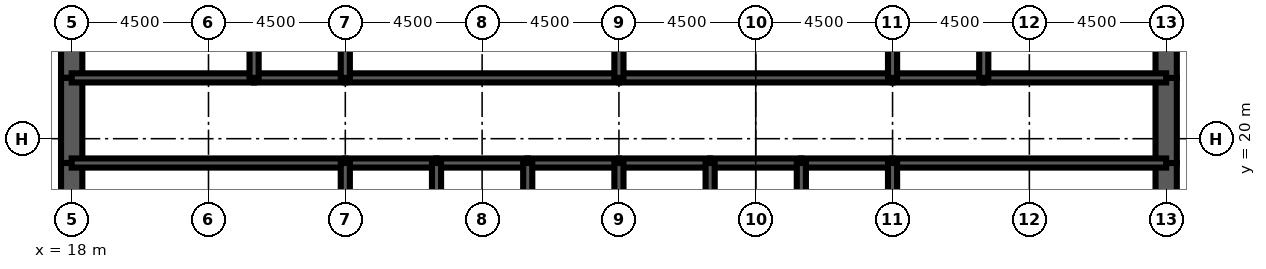
"""IFC4 building model, lengths in metres.
Left out: names, types, materials, properties, quantities, classifications, styles, units other than length and angle.
Written with IfcOpenShell. Run it as: python <this file> out.ifc"""

import sys

from ifc_helpers import new_model, si_unit, direction, frame, frame_2d, origin, place, context, subcontext, project, spatial, rectangle, extrude, element, fill, save


model = new_model("IFC4")
c1 = context("Model", 3, precision=1e-05, world=origin(), true_north=direction((0.0, 1.0)))
c2 = subcontext(c1, "Body", "Model", "MODEL_VIEW")
j1 = project(units=[si_unit("LENGTHUNIT", "METRE"), si_unit("PLANEANGLEUNIT", "RADIAN")], contexts=[c1])
p1 = place(None, origin())
s1 = spatial("IfcSite", under=j1, at=p1, CompositionType="ELEMENT")
p2 = place(p1, origin())
s2 = spatial("IfcBuilding", under=s1, at=p2, CompositionType="ELEMENT")
p3 = place(p2, frame((0.0, 0.0, 275.3)))
s3 = spatial("IfcBuildingStorey", under=s2, at=p3, CompositionType="ELEMENT", Elevation=275.3)
p4 = place(p3, frame((18.0, 26.0, 0.0), z_axis=(0.0, 0.0, 1.0), x_axis=(0.0, -1.0, 0.0)))
e1 = element("IfcWall", 1, at=p4, inside=s3, PredefinedType="SHEAR", context=c2, shape_type="SweptSolid", body=[
    extrude(rectangle(XDim=4.0, YDim=0.7, at=frame_2d((2.0, 0.0))), origin(), (0.0, 0.0, 1.0), 4.2),
])
p5 = place(p3, frame((18.0, 22.0, 0.0), z_axis=(0.0, 0.0, 1.0), x_axis=(0.0, -1.0, 0.0)))
e2 = element("IfcWall", 2, at=p5, inside=s3, PredefinedType="SHEAR", context=c2, shape_type="SweptSolid", body=[
    extrude(rectangle(XDim=2.8, YDim=0.7, at=frame_2d((1.4, 0.0))), origin(), (0.0, 0.0, 1.0), 4.2),
])
p6 = place(p5, frame((0.6, 0.0, 0.0)))
e3 = element("IfcOpeningElement", 3, at=p6, cuts=e2, PredefinedType="OPENING", context=c2, shape_type="SweptSolid", body=[
    extrude(rectangle(XDim=1.8, YDim=2.1, at=frame_2d((0.9, 1.05))), frame((0.0, 0.36, 0.0), z_axis=(0.0, -1.0, 0.0), x_axis=(1.0, 0.0, 0.0)), (0.0, 0.0, 1.0), 0.72),
])
for number, where, z_axis, x_axis in (
    (4, (18.0, 19.2, 0.0), (0.0, 0.0, 1.0), (0.0, -1.0, 0.0)),
    (5, (54.0, 16.0, 0.0), (0.0, 0.0, 1.0), (0.0, 1.0, 0.0)),
):
    element("IfcWall", number, at=place(p3, frame(where, z_axis=z_axis, x_axis=x_axis)), inside=s3, PredefinedType="SHEAR", context=c2, shape_type="SweptSolid", body=[
        extrude(rectangle(XDim=3.2, YDim=0.7, at=frame_2d((1.6, 0.0))), origin(), (0.0, 0.0, 1.0), 4.2),
    ])
p7 = place(p3, frame((54.0, 19.2, 0.0), z_axis=(0.0, 0.0, 1.0), x_axis=(0.0, 1.0, 0.0)))
e6 = element("IfcWall", 6, at=p7, inside=s3, PredefinedType="SHEAR", context=c2, shape_type="SweptSolid", body=[
    extrude(rectangle(XDim=2.8, YDim=0.7, at=frame_2d((1.4, 0.0))), origin(), (0.0, 0.0, 1.0), 4.2),
])
p8 = place(p7, frame((0.4, 0.0, 0.0)))
e7 = element("IfcOpeningElement", 7, at=p8, cuts=e6, PredefinedType="OPENING", context=c2, shape_type="SweptSolid", body=[
    extrude(rectangle(XDim=1.8, YDim=2.1, at=frame_2d((0.9, 1.05))), frame((0.0, 0.36, 0.0), z_axis=(0.0, -1.0, 0.0), x_axis=(1.0, 0.0, 0.0)), (0.0, 0.0, 1.0), 0.72),
])
p9 = place(p3, frame((54.0, 22.0, 0.0), z_axis=(0.0, 0.0, 1.0), x_axis=(0.0, 1.0, 0.0)))
e8 = element("IfcWall", 8, at=p9, inside=s3, PredefinedType="SHEAR", context=c2, shape_type="SweptSolid", body=[
    extrude(rectangle(XDim=4.0, YDim=0.7, at=frame_2d((2.0, 0.0))), origin(), (0.0, 0.0, 1.0), 4.2),
])
p10 = place(p3, frame((18.0, 19.2, 0.0), z_axis=(0.0, 0.0, 1.0), x_axis=(1.0, 0.0, 0.0)))
e9 = element("IfcWall", 9, at=p10, inside=s3, PredefinedType="SOLIDWALL", context=c2, shape_type="SweptSolid", body=[
    extrude(rectangle(XDim=9.0, YDim=0.3, at=frame_2d((4.5, 0.0))), origin(), (0.0, 0.0, 1.0), 4.2),
])
p11 = place(p10, frame((0.65, 0.0, 0.0)))
e10 = element("IfcOpeningElement", 10, at=p11, cuts=e9, PredefinedType="OPENING", context=c2, shape_type="SweptSolid", body=[
    extrude(rectangle(XDim=1.0, YDim=2.1, at=frame_2d((0.5, 1.05))), frame((0.0, 0.16, 0.0), z_axis=(0.0, -1.0, 0.0), x_axis=(1.0, 0.0, 0.0)), (0.0, 0.0, 1.0), 0.32),
])
p12 = place(p3, frame((27.0, 19.2, 0.0), z_axis=(0.0, 0.0, 1.0), x_axis=(1.0, 0.0, 0.0)))
e11 = element("IfcWall", 11, at=p12, inside=s3, PredefinedType="SOLIDWALL", context=c2, shape_type="SweptSolid", body=[
    extrude(rectangle(XDim=3.0, YDim=0.3, at=frame_2d((1.5, 0.0))), origin(), (0.0, 0.0, 1.0), 4.2),
])
p13 = place(p12, frame((0.95, 0.0, 0.0)))
e12 = element("IfcOpeningElement", 12, at=p13, cuts=e11, PredefinedType="OPENING", context=c2, shape_type="SweptSolid", body=[
    extrude(rectangle(XDim=1.1, YDim=2.2, at=frame_2d((0.55, 1.1))), frame((0.0, 0.16, 0.0), z_axis=(0.0, -1.0, 0.0), x_axis=(1.0, 0.0, 0.0)), (0.0, 0.0, 1.0), 0.32),
])
p14 = place(p3, frame((30.0, 19.2, 0.0), z_axis=(0.0, 0.0, 1.0), x_axis=(1.0, 0.0, 0.0)))
e13 = element("IfcWall", 13, at=p14, inside=s3, PredefinedType="SOLIDWALL", context=c2, shape_type="SweptSolid", body=[
    extrude(rectangle(XDim=3.0, YDim=0.3, at=frame_2d((1.5, 0.0))), origin(), (0.0, 0.0, 1.0), 4.2),
])
p15 = place(p14, frame((0.95, 0.0, 0.0)))
e14 = element("IfcOpeningElement", 14, at=p15, cuts=e13, PredefinedType="OPENING", context=c2, shape_type="SweptSolid", body=[
    extrude(rectangle(XDim=1.1, YDim=2.2, at=frame_2d((0.55, 1.1))), frame((0.0, 0.16, 0.0), z_axis=(0.0, -1.0, 0.0), x_axis=(1.0, 0.0, 0.0)), (0.0, 0.0, 1.0), 0.32),
])
p16 = place(p3, frame((33.0, 19.2, 0.0), z_axis=(0.0, 0.0, 1.0), x_axis=(1.0, 0.0, 0.0)))
e15 = element("IfcWall", 15, at=p16, inside=s3, PredefinedType="SOLIDWALL", context=c2, shape_type="SweptSolid", body=[
    extrude(rectangle(XDim=3.0, YDim=0.3, at=frame_2d((1.5, 0.0))), origin(), (0.0, 0.0, 1.0), 4.2),
])
p17 = place(p16, frame((0.95, 0.0, 0.0)))
e16 = element("IfcOpeningElement", 16, at=p17, cuts=e15, PredefinedType="OPENING", context=c2, shape_type="SweptSolid", body=[
    extrude(rectangle(XDim=1.1, YDim=2.2, at=frame_2d((0.55, 1.1))), frame((0.0, 0.16, 0.0), z_axis=(0.0, -1.0, 0.0), x_axis=(1.0, 0.0, 0.0)), (0.0, 0.0, 1.0), 0.32),
])
p18 = place(p3, frame((36.0, 19.2, 0.0), z_axis=(0.0, 0.0, 1.0), x_axis=(1.0, 0.0, 0.0)))
e17 = element("IfcWall", 17, at=p18, inside=s3, PredefinedType="SOLIDWALL", context=c2, shape_type="SweptSolid", body=[
    extrude(rectangle(XDim=3.0, YDim=0.3, at=frame_2d((1.5, 0.0))), origin(), (0.0, 0.0, 1.0), 4.2),
])
p19 = place(p18, frame((0.95, 0.0, 0.0)))
e18 = element("IfcOpeningElement", 18, at=p19, cuts=e17, PredefinedType="OPENING", context=c2, shape_type="SweptSolid", body=[
    extrude(rectangle(XDim=1.1, YDim=2.2, at=frame_2d((0.55, 1.1))), frame((0.0, 0.16, 0.0), z_axis=(0.0, -1.0, 0.0), x_axis=(1.0, 0.0, 0.0)), (0.0, 0.0, 1.0), 0.32),
])
p20 = place(p3, frame((39.0, 19.2, 0.0), z_axis=(0.0, 0.0, 1.0), x_axis=(1.0, 0.0, 0.0)))
e19 = element("IfcWall", 19, at=p20, inside=s3, PredefinedType="SOLIDWALL", context=c2, shape_type="SweptSolid", body=[
    extrude(rectangle(XDim=3.0, YDim=0.3, at=frame_2d((1.5, 0.0))), origin(), (0.0, 0.0, 1.0), 4.2),
])
p21 = place(p20, frame((1.0, 0.0, 0.0)))
e20 = element("IfcOpeningElement", 20, at=p21, cuts=e19, PredefinedType="OPENING", context=c2, shape_type="SweptSolid", body=[
    extrude(rectangle(XDim=1.0, YDim=2.1, at=frame_2d((0.5, 1.05))), frame((0.0, 0.16, 0.0), z_axis=(0.0, -1.0, 0.0), x_axis=(1.0, 0.0, 0.0)), (0.0, 0.0, 1.0), 0.32),
])
p22 = place(p3, frame((42.0, 19.2, 0.0), z_axis=(0.0, 0.0, 1.0), x_axis=(1.0, 0.0, 0.0)))
e21 = element("IfcWall", 21, at=p22, inside=s3, PredefinedType="SOLIDWALL", context=c2, shape_type="SweptSolid", body=[
    extrude(rectangle(XDim=3.0, YDim=0.3, at=frame_2d((1.5, 0.0))), origin(), (0.0, 0.0, 1.0), 4.2),
])
p23 = place(p22, frame((1.0, 0.0, 0.0)))
e22 = element("IfcOpeningElement", 22, at=p23, cuts=e21, PredefinedType="OPENING", context=c2, shape_type="SweptSolid", body=[
    extrude(rectangle(XDim=1.0, YDim=2.1, at=frame_2d((0.5, 1.05))), frame((0.0, 0.16, 0.0), z_axis=(0.0, -1.0, 0.0), x_axis=(1.0, 0.0, 0.0)), (0.0, 0.0, 1.0), 0.32),
])
p24 = place(p3, frame((45.0, 19.2, 0.0), z_axis=(0.0, 0.0, 1.0), x_axis=(1.0, 0.0, 0.0)))
e23 = element("IfcWall", 23, at=p24, inside=s3, PredefinedType="SOLIDWALL", context=c2, shape_type="SweptSolid", body=[
    extrude(rectangle(XDim=9.0, YDim=0.3, at=frame_2d((4.5, 0.0))), origin(), (0.0, 0.0, 1.0), 4.2),
])
p25 = place(p24, frame((7.35, 0.0, 0.0)))
e24 = element("IfcOpeningElement", 24, at=p25, cuts=e23, PredefinedType="OPENING", context=c2, shape_type="SweptSolid", body=[
    extrude(rectangle(XDim=1.0, YDim=2.1, at=frame_2d((0.5, 1.05))), frame((0.0, 0.16, 0.0), z_axis=(0.0, -1.0, 0.0), x_axis=(1.0, 0.0, 0.0)), (0.0, 0.0, 1.0), 0.32),
])
p26 = place(p3, frame((18.0, 22.0, 0.0), z_axis=(0.0, 0.0, 1.0), x_axis=(1.0, 0.0, 0.0)))
e25 = element("IfcWall", 25, at=p26, inside=s3, PredefinedType="SOLIDWALL", context=c2, shape_type="SweptSolid", body=[
    extrude(rectangle(XDim=6.0, YDim=0.3, at=frame_2d((3.0, 0.0))), origin(), (0.0, 0.0, 1.0), 4.2),
])
p27 = place(p26, frame((4.4, 0.0, 0.0)))
e26 = element("IfcOpeningElement", 26, at=p27, cuts=e25, PredefinedType="OPENING", context=c2, shape_type="SweptSolid", body=[
    extrude(rectangle(XDim=1.0, YDim=2.1, at=frame_2d((0.5, 1.05))), frame((0.0, 0.16, 0.0), z_axis=(0.0, -1.0, 0.0), x_axis=(1.0, 0.0, 0.0)), (0.0, 0.0, 1.0), 0.32),
])
p28 = place(p26, frame((0.9, 0.0, 0.0)))
e27 = element("IfcOpeningElement", 27, at=p28, cuts=e25, PredefinedType="OPENING", context=c2, shape_type="SweptSolid", body=[
    extrude(rectangle(XDim=1.0, YDim=2.1, at=frame_2d((0.5, 1.05))), frame((0.0, 0.16, 0.0), z_axis=(0.0, -1.0, 0.0), x_axis=(1.0, 0.0, 0.0)), (0.0, 0.0, 1.0), 0.32),
])
p29 = place(p3, frame((24.0, 22.0, 0.0), z_axis=(0.0, 0.0, 1.0), x_axis=(1.0, 0.0, 0.0)))
e28 = element("IfcWall", 28, at=p29, inside=s3, PredefinedType="SOLIDWALL", context=c2, shape_type="SweptSolid", body=[
    extrude(rectangle(XDim=3.0, YDim=0.3, at=frame_2d((1.5, 0.0))), origin(), (0.0, 0.0, 1.0), 4.2),
])
p30 = place(p29, frame((1.0, 0.0, 0.0)))
e29 = element("IfcOpeningElement", 29, at=p30, cuts=e28, PredefinedType="OPENING", context=c2, shape_type="SweptSolid", body=[
    extrude(rectangle(XDim=1.0, YDim=2.1, at=frame_2d((0.5, 1.05))), frame((0.0, 0.16, 0.0), z_axis=(0.0, -1.0, 0.0), x_axis=(1.0, 0.0, 0.0)), (0.0, 0.0, 1.0), 0.32),
])
p31 = place(p3, frame((27.0, 22.0, 0.0), z_axis=(0.0, 0.0, 1.0), x_axis=(1.0, 0.0, 0.0)))
e30 = element("IfcWall", 30, at=p31, inside=s3, PredefinedType="SOLIDWALL", context=c2, shape_type="SweptSolid", body=[
    extrude(rectangle(XDim=9.0, YDim=0.3, at=frame_2d((4.5, 0.0))), origin(), (0.0, 0.0, 1.0), 4.2),
])
p32 = place(p31, frame((4.0, 0.0, 0.0)))
e31 = element("IfcOpeningElement", 31, at=p32, cuts=e30, PredefinedType="OPENING", context=c2, shape_type="SweptSolid", body=[
    extrude(rectangle(XDim=1.0, YDim=2.1, at=frame_2d((0.5, 1.05))), frame((0.0, 0.16, 0.0), z_axis=(0.0, -1.0, 0.0), x_axis=(1.0, 0.0, 0.0)), (0.0, 0.0, 1.0), 0.32),
])
p33 = place(p3, frame((36.0, 22.0, 0.0), z_axis=(0.0, 0.0, 1.0), x_axis=(1.0, 0.0, 0.0)))
e32 = element("IfcWall", 32, at=p33, inside=s3, PredefinedType="SOLIDWALL", context=c2, shape_type="SweptSolid", body=[
    extrude(rectangle(XDim=9.0, YDim=0.3, at=frame_2d((4.5, 0.0))), origin(), (0.0, 0.0, 1.0), 4.2),
])
p34 = place(p33, frame((4.0, 0.0, 0.0)))
e33 = element("IfcOpeningElement", 33, at=p34, cuts=e32, PredefinedType="OPENING", context=c2, shape_type="SweptSolid", body=[
    extrude(rectangle(XDim=1.0, YDim=2.1, at=frame_2d((0.5, 1.05))), frame((0.0, 0.16, 0.0), z_axis=(0.0, -1.0, 0.0), x_axis=(1.0, 0.0, 0.0)), (0.0, 0.0, 1.0), 0.32),
])
p35 = place(p3, frame((45.0, 22.0, 0.0), z_axis=(0.0, 0.0, 1.0), x_axis=(1.0, 0.0, 0.0)))
e34 = element("IfcWall", 34, at=p35, inside=s3, PredefinedType="SOLIDWALL", context=c2, shape_type="SweptSolid", body=[
    extrude(rectangle(XDim=3.0, YDim=0.3, at=frame_2d((1.5, 0.0))), origin(), (0.0, 0.0, 1.0), 4.2),
])
p36 = place(p35, frame((1.0, 0.0, 0.0)))
e35 = element("IfcOpeningElement", 35, at=p36, cuts=e34, PredefinedType="OPENING", context=c2, shape_type="SweptSolid", body=[
    extrude(rectangle(XDim=1.0, YDim=2.1, at=frame_2d((0.5, 1.05))), frame((0.0, 0.16, 0.0), z_axis=(0.0, -1.0, 0.0), x_axis=(1.0, 0.0, 0.0)), (0.0, 0.0, 1.0), 0.32),
])
p37 = place(p3, frame((48.0, 22.0, 0.0), z_axis=(0.0, 0.0, 1.0), x_axis=(1.0, 0.0, 0.0)))
e36 = element("IfcWall", 36, at=p37, inside=s3, PredefinedType="SOLIDWALL", context=c2, shape_type="SweptSolid", body=[
    extrude(rectangle(XDim=6.0, YDim=0.3, at=frame_2d((3.0, 0.0))), origin(), (0.0, 0.0, 1.0), 4.2),
])
p38 = place(p37, frame((2.0, 0.0, 0.0)))
e37 = element("IfcOpeningElement", 37, at=p38, cuts=e36, PredefinedType="OPENING", context=c2, shape_type="SweptSolid", body=[
    extrude(rectangle(XDim=1.0, YDim=2.1, at=frame_2d((0.5, 1.05))), frame((0.0, 0.16, 0.0), z_axis=(0.0, -1.0, 0.0), x_axis=(1.0, 0.0, 0.0)), (0.0, 0.0, 1.0), 0.32),
])
p39 = place(p37, frame((4.1, 0.0, 0.0)))
e38 = element("IfcOpeningElement", 38, at=p39, cuts=e36, PredefinedType="OPENING", context=c2, shape_type="SweptSolid", body=[
    extrude(rectangle(XDim=1.0, YDim=2.1, at=frame_2d((0.5, 1.05))), frame((0.0, 0.16, 0.0), z_axis=(0.0, -1.0, 0.0), x_axis=(1.0, 0.0, 0.0)), (0.0, 0.0, 1.0), 0.32),
])
for number, where, z_axis, x_axis in (
    (39, (27.0, 16.0, 0.0), (0.0, 0.0, 1.0), (0.0, 1.0, 0.0)),
    (40, (30.0, 16.0, 0.0), (0.0, 0.0, 1.0), (0.0, 1.0, 0.0)),
    (41, (33.0, 16.0, 0.0), (0.0, 0.0, 1.0), (0.0, 1.0, 0.0)),
    (42, (36.0, 16.0, 0.0), (0.0, 0.0, 1.0), (0.0, 1.0, 0.0)),
    (43, (39.0, 16.0, 0.0), (0.0, 0.0, 1.0), (0.0, 1.0, 0.0)),
    (44, (42.0, 16.0, 0.0), (0.0, 0.0, 1.0), (0.0, 1.0, 0.0)),
    (45, (45.0, 16.0, 0.0), (0.0, 0.0, 1.0), (0.0, 1.0, 0.0)),
):
    element("IfcWall", number, at=place(p3, frame(where, z_axis=z_axis, x_axis=x_axis)), inside=s3, PredefinedType="SOLIDWALL", context=c2, shape_type="SweptSolid", body=[
        extrude(rectangle(XDim=3.2, YDim=0.3, at=frame_2d((1.6, 0.0))), origin(), (0.0, 0.0, 1.0), 4.2),
    ])
for number, where, z_axis, x_axis in (
    (46, (24.0, 22.0, 0.0), (0.0, 0.0, 1.0), (0.0, 1.0, 0.0)),
    (47, (27.0, 22.0, 0.0), (0.0, 0.0, 1.0), (0.0, 1.0, 0.0)),
    (48, (36.0, 22.0, 0.0), (0.0, 0.0, 1.0), (0.0, 1.0, 0.0)),
    (49, (45.0, 22.0, 0.0), (0.0, 0.0, 1.0), (0.0, 1.0, 0.0)),
    (50, (48.0, 22.0, 0.0), (0.0, 0.0, 1.0), (0.0, 1.0, 0.0)),
):
    element("IfcWall", number, at=place(p3, frame(where, z_axis=z_axis, x_axis=x_axis)), inside=s3, PredefinedType="SOLIDWALL", context=c2, shape_type="SweptSolid", body=[
        extrude(rectangle(XDim=4.0, YDim=0.3, at=frame_2d((2.0, 0.0))), origin(), (0.0, 0.0, 1.0), 4.2),
    ])
p40 = place(p3, frame((42.0, 22.15, 0.0), z_axis=(0.0, 0.0, 1.0), x_axis=(0.0, 1.0, 0.0)))
e51 = element("IfcWall", 51, at=p40, inside=s3, PredefinedType="PARTITIONING", context=c2, shape_type="SweptSolid", body=[
    extrude(rectangle(XDim=3.7, YDim=0.15, at=frame_2d((1.85, 0.0))), origin(), (0.0, 0.0, 1.0), 3.0),
])
p41 = place(p40, frame((2.2, 0.0, 0.0)))
e52 = element("IfcOpeningElement", 52, at=p41, cuts=e51, PredefinedType="OPENING", context=c2, shape_type="SweptSolid", body=[
    extrude(rectangle(XDim=1.0, YDim=2.1, at=frame_2d((0.5, 1.05))), frame((0.0, 0.085, 0.0), z_axis=(0.0, -1.0, 0.0), x_axis=(1.0, 0.0, 0.0)), (0.0, 0.0, 1.0), 0.17),
])
for number, where, z_axis, x_axis in (
    (53, (20.525, 22.15, 0.0), (0.0, 0.0, 1.0), (0.0, 1.0, 0.0)),
    (54, (51.475, 22.15, 0.0), (0.0, 0.0, 1.0), (0.0, 1.0, 0.0)),
):
    element("IfcWall", number, at=place(p3, frame(where, z_axis=z_axis, x_axis=x_axis)), inside=s3, PredefinedType="PARTITIONING", context=c2, shape_type="SweptSolid", body=[
        extrude(rectangle(XDim=3.7, YDim=0.15, at=frame_2d((1.85, 0.0))), origin(), (0.0, 0.0, 1.0), 3.0),
    ])
p42 = place(p13, origin())
e55 = element("IfcDoor", 55, at=p42, inside=s3, OperationType="DOUBLE_DOOR_SLIDING", PredefinedType="USERDEFINED", context=c2, shape_type="SweptSolid", body=[
    extrude(rectangle(XDim=1.1, YDim=2.2, at=frame_2d((0.55, 1.1))), frame((0.0, 0.025, 0.0), z_axis=(0.0, -1.0, 0.0), x_axis=(1.0, 0.0, 0.0)), (0.0, 0.0, 1.0), 0.05),
])
fill(e12, e55)
p43 = place(p15, origin())
e56 = element("IfcDoor", 56, at=p43, inside=s3, OperationType="DOUBLE_DOOR_SLIDING", PredefinedType="USERDEFINED", context=c2, shape_type="SweptSolid", body=[
    extrude(rectangle(XDim=1.1, YDim=2.2, at=frame_2d((0.55, 1.1))), frame((0.0, 0.025, 0.0), z_axis=(0.0, -1.0, 0.0), x_axis=(1.0, 0.0, 0.0)), (0.0, 0.0, 1.0), 0.05),
])
fill(e14, e56)
p44 = place(p17, origin())
e57 = element("IfcDoor", 57, at=p44, inside=s3, OperationType="DOUBLE_DOOR_SLIDING", PredefinedType="USERDEFINED", context=c2, shape_type="SweptSolid", body=[
    extrude(rectangle(XDim=1.1, YDim=2.2, at=frame_2d((0.55, 1.1))), frame((0.0, 0.025, 0.0), z_axis=(0.0, -1.0, 0.0), x_axis=(1.0, 0.0, 0.0)), (0.0, 0.0, 1.0), 0.05),
])
fill(e16, e57)
p45 = place(p19, origin())
e58 = element("IfcDoor", 58, at=p45, inside=s3, OperationType="DOUBLE_DOOR_SLIDING", PredefinedType="USERDEFINED", context=c2, shape_type="SweptSolid", body=[
    extrude(rectangle(XDim=1.1, YDim=2.2, at=frame_2d((0.55, 1.1))), frame((0.0, 0.025, 0.0), z_axis=(0.0, -1.0, 0.0), x_axis=(1.0, 0.0, 0.0)), (0.0, 0.0, 1.0), 0.05),
])
fill(e18, e58)
p46 = place(p11, origin())
e59 = element("IfcDoor", 59, at=p46, inside=s3, OperationType="SINGLE_SWING_LEFT", PredefinedType="DOOR", context=c2, shape_type="SweptSolid", body=[
    extrude(rectangle(XDim=1.0, YDim=2.1, at=frame_2d((0.5, 1.05))), frame((0.0, 0.025, 0.0), z_axis=(0.0, -1.0, 0.0), x_axis=(1.0, 0.0, 0.0)), (0.0, 0.0, 1.0), 0.05),
])
fill(e10, e59)
p47 = place(p25, origin())
e60 = element("IfcDoor", 60, at=p47, inside=s3, OperationType="SINGLE_SWING_RIGHT", PredefinedType="DOOR", context=c2, shape_type="SweptSolid", body=[
    extrude(rectangle(XDim=1.0, YDim=2.1, at=frame_2d((0.5, 1.05))), frame((0.0, 0.025, 0.0), z_axis=(0.0, -1.0, 0.0), x_axis=(1.0, 0.0, 0.0)), (0.0, 0.0, 1.0), 0.05),
])
fill(e24, e60)
p48 = place(p6, origin())
e61 = element("IfcDoor", 61, at=p48, inside=s3, OperationType="SINGLE_SWING_LEFT", PredefinedType="DOOR", context=c2, shape_type="SweptSolid", body=[
    extrude(rectangle(XDim=1.8, YDim=2.1, at=frame_2d((0.9, 1.05))), frame((0.0, 0.35, 0.0), z_axis=(0.0, -1.0, 0.0), x_axis=(1.0, 0.0, 0.0)), (0.0, 0.0, 1.0), 0.699),
])
fill(e3, e61)
p49 = place(p8, origin())
e62 = element("IfcDoor", 62, at=p49, inside=s3, OperationType="SINGLE_SWING_LEFT", PredefinedType="DOOR", context=c2, shape_type="SweptSolid", body=[
    extrude(rectangle(XDim=1.8, YDim=2.1, at=frame_2d((0.9, 1.05))), frame((0.0, 0.35, 0.0), z_axis=(0.0, -1.0, 0.0), x_axis=(1.0, 0.0, 0.0)), (0.0, 0.0, 1.0), 0.699),
])
fill(e7, e62)
p50 = place(p27, origin())
e63 = element("IfcDoor", 63, at=p50, inside=s3, OperationType="SINGLE_SWING_RIGHT", PredefinedType="DOOR", context=c2, shape_type="SweptSolid", body=[
    extrude(rectangle(XDim=1.0, YDim=2.1, at=frame_2d((0.5, 1.05))), frame((0.0, 0.025, 0.0), z_axis=(0.0, -1.0, 0.0), x_axis=(1.0, 0.0, 0.0)), (0.0, 0.0, 1.0), 0.05),
])
fill(e26, e63)
p51 = place(p30, origin())
e64 = element("IfcDoor", 64, at=p51, inside=s3, OperationType="SINGLE_SWING_LEFT", PredefinedType="DOOR", context=c2, shape_type="SweptSolid", body=[
    extrude(rectangle(XDim=1.0, YDim=2.1, at=frame_2d((0.5, 1.05))), frame((0.0, 0.025, 0.0), z_axis=(0.0, -1.0, 0.0), x_axis=(1.0, 0.0, 0.0)), (0.0, 0.0, 1.0), 0.05),
])
fill(e29, e64)
p52 = place(p32, origin())
e65 = element("IfcDoor", 65, at=p52, inside=s3, OperationType="SINGLE_SWING_LEFT", PredefinedType="DOOR", context=c2, shape_type="SweptSolid", body=[
    extrude(rectangle(XDim=1.0, YDim=2.1, at=frame_2d((0.5, 1.05))), frame((0.0, 0.025, 0.0), z_axis=(0.0, -1.0, 0.0), x_axis=(1.0, 0.0, 0.0)), (0.0, 0.0, 1.0), 0.05),
])
fill(e31, e65)
p53 = place(p34, origin())
e66 = element("IfcDoor", 66, at=p53, inside=s3, OperationType="SINGLE_SWING_LEFT", PredefinedType="DOOR", context=c2, shape_type="SweptSolid", body=[
    extrude(rectangle(XDim=1.0, YDim=2.1, at=frame_2d((0.5, 1.05))), frame((0.0, 0.025, 0.0), z_axis=(0.0, -1.0, 0.0), x_axis=(1.0, 0.0, 0.0)), (0.0, 0.0, 1.0), 0.05),
])
fill(e33, e66)
p54 = place(p36, origin())
e67 = element("IfcDoor", 67, at=p54, inside=s3, OperationType="SINGLE_SWING_LEFT", PredefinedType="DOOR", context=c2, shape_type="SweptSolid", body=[
    extrude(rectangle(XDim=1.0, YDim=2.1, at=frame_2d((0.5, 1.05))), frame((0.0, 0.025, 0.0), z_axis=(0.0, -1.0, 0.0), x_axis=(1.0, 0.0, 0.0)), (0.0, 0.0, 1.0), 0.05),
])
fill(e35, e67)
p55 = place(p38, origin())
e68 = element("IfcDoor", 68, at=p55, inside=s3, OperationType="SINGLE_SWING_LEFT", PredefinedType="DOOR", context=c2, shape_type="SweptSolid", body=[
    extrude(rectangle(XDim=1.0, YDim=2.1, at=frame_2d((0.5, 1.05))), frame((0.0, 0.025, 0.0), z_axis=(0.0, -1.0, 0.0), x_axis=(1.0, 0.0, 0.0)), (0.0, 0.0, 1.0), 0.05),
])
fill(e37, e68)
p56 = place(p28, origin())
e69 = element("IfcDoor", 69, at=p56, inside=s3, OperationType="SINGLE_SWING_LEFT", PredefinedType="DOOR", context=c2, shape_type="SweptSolid", body=[
    extrude(rectangle(XDim=1.0, YDim=2.1, at=frame_2d((0.5, 1.05))), frame((0.0, 0.025, 0.0), z_axis=(0.0, -1.0, 0.0), x_axis=(1.0, 0.0, 0.0)), (0.0, 0.0, 1.0), 0.05),
])
fill(e27, e69)
p57 = place(p39, origin())
e70 = element("IfcDoor", 70, at=p57, inside=s3, OperationType="SINGLE_SWING_RIGHT", PredefinedType="DOOR", context=c2, shape_type="SweptSolid", body=[
    extrude(rectangle(XDim=1.0, YDim=2.1, at=frame_2d((0.5, 1.05))), frame((0.0, 0.025, 0.0), z_axis=(0.0, -1.0, 0.0), x_axis=(1.0, 0.0, 0.0)), (0.0, 0.0, 1.0), 0.05),
])
fill(e38, e70)
p58 = place(p21, origin())
e71 = element("IfcDoor", 71, at=p58, inside=s3, OperationType="SINGLE_SWING_LEFT", PredefinedType="DOOR", context=c2, shape_type="SweptSolid", body=[
    extrude(rectangle(XDim=1.0, YDim=2.1, at=frame_2d((0.5, 1.05))), frame((0.0, 0.025, 0.0), z_axis=(0.0, -1.0, 0.0), x_axis=(1.0, 0.0, 0.0)), (0.0, 0.0, 1.0), 0.05),
])
fill(e20, e71)
p59 = place(p23, origin())
e72 = element("IfcDoor", 72, at=p59, inside=s3, OperationType="SINGLE_SWING_LEFT", PredefinedType="DOOR", context=c2, shape_type="SweptSolid", body=[
    extrude(rectangle(XDim=1.0, YDim=2.1, at=frame_2d((0.5, 1.05))), frame((0.0, 0.025, 0.0), z_axis=(0.0, -1.0, 0.0), x_axis=(1.0, 0.0, 0.0)), (0.0, 0.0, 1.0), 0.05),
])
fill(e22, e72)
save(model, sys.argv[1])
